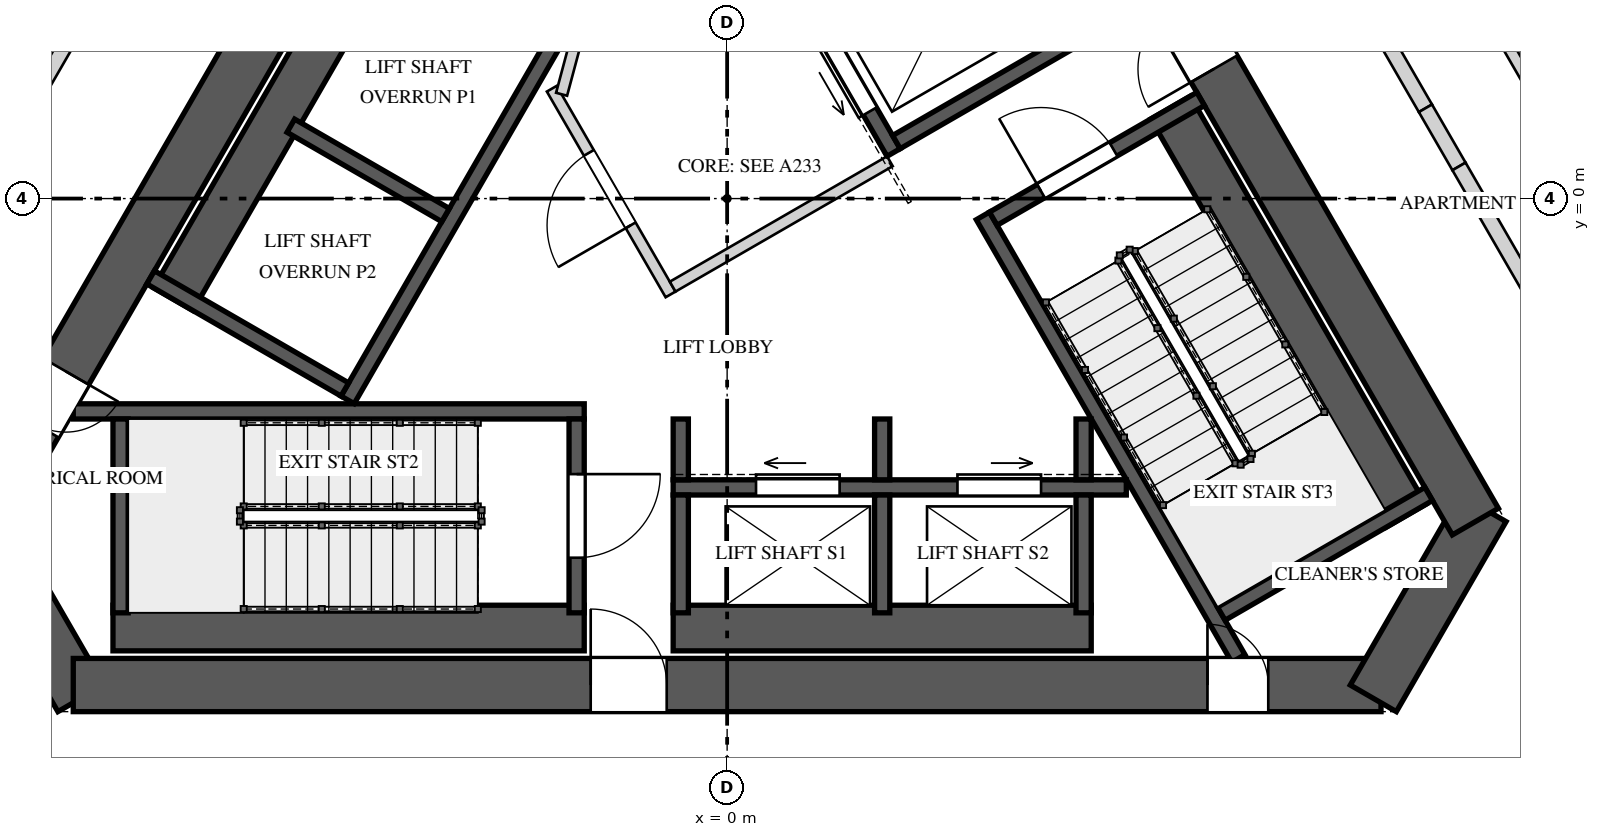
"""IFC4 building model, lengths in metres.
Left out: names, types, materials, properties, quantities, classifications, styles, units other than length and angle.
Written with IfcOpenShell. Run it as: python <this file> out.ifc"""

import sys

from ifc_helpers import new_model, si_unit, direction, frame, frame_2d, origin, place, context, subcontext, project, spatial, rectangle, extrude, element, fill, save


model = new_model("IFC4")
c1 = context("Model", 3, precision=1e-05, world=origin(), true_north=direction((0.0, 1.0)))
c2 = subcontext(c1, "Body", "Model", "MODEL_VIEW")
j1 = project(units=[si_unit("LENGTHUNIT", "METRE"), si_unit("PLANEANGLEUNIT", "RADIAN")], contexts=[c1])
p1 = place(None, origin())
s1 = spatial("IfcSite", under=j1, at=p1, CompositionType="ELEMENT")
p2 = place(p1, origin())
s2 = spatial("IfcBuilding", under=s1, at=p2, CompositionType="ELEMENT")
p3 = place(p2, frame((0.0, 0.0, 241.2)))
s3 = spatial("IfcBuildingStorey", under=s2, at=p3, CompositionType="ELEMENT", Elevation=241.2)
p4 = place(p3, frame((-1.241, 10.65, 0.0), z_axis=(0.0, 0.0, 1.0), x_axis=(-0.500003331888, -0.866023480109, 0.0)))
e1 = element("IfcWall", 1, at=p4, inside=s3, PredefinedType="SHEAR", context=c2, shape_type="SweptSolid", body=[
    extrude(rectangle(XDim=17.205, YDim=0.7, at=frame_2d((8.603, 0.0))), origin(), (0.0, 0.0, 1.0), 4.0),
])
p5 = place(p4, frame((6.808, 0.0, 0.0)))
e2 = element("IfcOpeningElement", 2, at=p5, cuts=e1, PredefinedType="OPENING", context=c2, shape_type="SweptSolid", body=[
    extrude(rectangle(XDim=1.0, YDim=2.4, at=frame_2d((0.5, 1.2))), frame((0.0, 0.36, 0.0), z_axis=(0.0, -1.0, 0.0), x_axis=(1.0, 0.0, 0.0)), (0.0, 0.0, 1.0), 0.72),
])
p6 = place(p4, frame((14.922, 0.0, 0.0)))
e3 = element("IfcOpeningElement", 3, at=p6, cuts=e1, PredefinedType="OPENING", context=c2, shape_type="SweptSolid", body=[
    extrude(rectangle(XDim=0.8, YDim=2.1, at=frame_2d((0.4, 1.05))), frame((0.0, 0.36, 0.0), z_axis=(0.0, -1.0, 0.0), x_axis=(1.0, 0.0, 0.0)), (0.0, 0.0, 1.0), 0.72),
])
p7 = place(p3, frame((-9.945, -4.075, 0.0), z_axis=(0.0, 0.0, 1.0), x_axis=(0.499995765644, -0.866027848477, 0.0)))
e4 = element("IfcWall", 4, at=p7, inside=s3, PredefinedType="SHEAR", context=c2, shape_type="SweptSolid", body=[
    extrude(rectangle(XDim=2.887, YDim=0.7, at=frame_2d((1.443, 0.0))), origin(), (0.0, 0.0, 1.0), 4.0),
])
p8 = place(p3, frame((-8.603, -6.4, 0.0), z_axis=(0.0, 0.0, 1.0), x_axis=(1.0, 0.0, 0.0)))
e5 = element("IfcWall", 5, at=p8, inside=s3, PredefinedType="SHEAR", context=c2, shape_type="SweptSolid", body=[
    extrude(rectangle(XDim=17.205, YDim=0.7, at=frame_2d((8.603, 0.0))), origin(), (0.0, 0.0, 1.0), 4.0),
])
p9 = place(p8, frame((6.808, 0.0, 0.0)))
e6 = element("IfcOpeningElement", 6, at=p9, cuts=e5, PredefinedType="OPENING", context=c2, shape_type="SweptSolid", body=[
    extrude(rectangle(XDim=1.0, YDim=2.4, at=frame_2d((0.5, 1.2))), frame((0.0, 0.36, 0.0), z_axis=(0.0, -1.0, 0.0), x_axis=(1.0, 0.0, 0.0)), (0.0, 0.0, 1.0), 0.72),
])
p10 = place(p8, frame((14.922, 0.0, 0.0)))
e7 = element("IfcOpeningElement", 7, at=p10, cuts=e5, PredefinedType="OPENING", context=c2, shape_type="SweptSolid", body=[
    extrude(rectangle(XDim=0.8, YDim=2.1, at=frame_2d((0.4, 1.05))), frame((0.0, 0.36, 0.0), z_axis=(0.0, -1.0, 0.0), x_axis=(1.0, 0.0, 0.0)), (0.0, 0.0, 1.0), 0.72),
])
p11 = place(p3, frame((8.501, -6.575, 0.0), z_axis=(0.0, 0.0, 1.0), x_axis=(0.499995765644, 0.866027848477, 0.0)))
e8 = element("IfcWall", 8, at=p11, inside=s3, PredefinedType="SHEAR", context=c2, shape_type="SweptSolid", body=[
    extrude(rectangle(XDim=2.887, YDim=0.7, at=frame_2d((1.443, 0.0))), origin(), (0.0, 0.0, 1.0), 4.0),
])
p12 = place(p3, frame((9.844, -4.25, 0.0), z_axis=(0.0, 0.0, 1.0), x_axis=(-0.500003331888, 0.866023480109, 0.0)))
e9 = element("IfcWall", 9, at=p12, inside=s3, PredefinedType="SHEAR", context=c2, shape_type="SweptSolid", body=[
    extrude(rectangle(XDim=17.205, YDim=0.7, at=frame_2d((8.603, 0.0))), origin(), (0.0, 0.0, 1.0), 4.0),
])
p13 = place(p12, frame((6.877, 0.0, 0.0)))
e10 = element("IfcOpeningElement", 10, at=p13, cuts=e9, PredefinedType="OPENING", context=c2, shape_type="SweptSolid", body=[
    extrude(rectangle(XDim=1.0, YDim=2.4, at=frame_2d((0.5, 1.2))), frame((0.0, 0.36, 0.0), z_axis=(0.0, -1.0, 0.0), x_axis=(1.0, 0.0, 0.0)), (0.0, 0.0, 1.0), 0.72),
])
p14 = place(p3, frame((9.892, -8.672, 0.0), z_axis=(0.0, 0.0, 1.0), x_axis=(0.587833242688, 0.808982125137, 0.0)))
e11 = element("IfcWall", 11, at=p14, inside=s3, PredefinedType="SOLIDWALL", context=c2, shape_type="SweptSolid", body=[
    extrude(rectangle(XDim=2.402, YDim=0.3, at=frame_2d((1.201, 0.0))), origin(), (0.0, 0.0, 1.0), 3.3),
])
p15 = place(p14, frame((0.351, 0.0, 0.0)))
e12 = element("IfcOpeningElement", 12, at=p15, cuts=e11, PredefinedType="OPENING", context=c2, shape_type="SweptSolid", body=[
    extrude(rectangle(XDim=1.7, YDim=2.5, at=frame_2d((0.85, 1.25))), frame((0.0, 0.16, 0.0), z_axis=(0.0, -1.0, 0.0), x_axis=(1.0, 0.0, 0.0)), (0.0, 0.0, 1.0), 0.32),
])
p16 = place(p3, frame((-8.08, -5.65, 0.0), z_axis=(0.0, 0.0, 1.0), x_axis=(1.0, 0.0, 0.0)))
e13 = element("IfcWall", 13, at=p16, inside=s3, PredefinedType="SOLIDWALL", context=c2, shape_type="SweptSolid", body=[
    extrude(rectangle(XDim=6.2, YDim=0.6, at=frame_2d((3.1, 0.0))), origin(), (0.0, 0.0, 1.0), 3.65),
])
p17 = place(p3, frame((-8.603, -2.8, 0.0), z_axis=(0.0, 0.0, 1.0), x_axis=(1.0, 0.0, 0.0)))
e14 = element("IfcWall", 14, at=p17, inside=s3, PredefinedType="SOLIDWALL", context=c2, shape_type="SweptSolid", body=[
    extrude(rectangle(XDim=6.723, YDim=0.2, at=frame_2d((3.361, 0.0))), origin(), (0.0, 0.0, 1.0), 3.65),
])
p18 = place(p3, frame((-7.98, -2.9, 0.0), z_axis=(0.0, 0.0, 1.0), x_axis=(0.0, -1.0, 0.0)))
e15 = element("IfcWall", 15, at=p18, inside=s3, PredefinedType="SOLIDWALL", context=c2, shape_type="SweptSolid", body=[
    extrude(rectangle(XDim=2.55, YDim=0.2, at=frame_2d((1.275, 0.0))), origin(), (0.0, 0.0, 1.0), 3.65),
])
p19 = place(p3, frame((-1.98, -2.9, 0.0), z_axis=(0.0, 0.0, 1.0), x_axis=(0.0, -1.0, 0.0)))
e16 = element("IfcWall", 16, at=p19, inside=s3, PredefinedType="SOLIDWALL", context=c2, shape_type="SweptSolid", body=[
    extrude(rectangle(XDim=2.55, YDim=0.2, at=frame_2d((1.275, 0.0))), origin(), (0.0, 0.0, 1.0), 3.65),
])
p20 = place(p19, frame((0.725, 0.0, 0.0)))
e17 = element("IfcOpeningElement", 17, at=p20, cuts=e16, PredefinedType="OPENING", context=c2, shape_type="SweptSolid", body=[
    extrude(rectangle(XDim=1.1, YDim=2.4, at=frame_2d((0.55, 1.2))), frame((0.0, 0.11, 0.0), z_axis=(0.0, -1.0, 0.0), x_axis=(1.0, 0.0, 0.0)), (0.0, 0.0, 1.0), 0.22),
])
p21 = place(p3, frame((8.933, -4.172, 0.0), z_axis=(0.0, 0.0, 1.0), x_axis=(-0.500026960575, 0.86600983753, 0.0)))
e18 = element("IfcWall", 18, at=p21, inside=s3, PredefinedType="SOLIDWALL", context=c2, shape_type="SweptSolid", body=[
    extrude(rectangle(XDim=6.2, YDim=0.6, at=frame_2d((3.1, 0.0))), origin(), (0.0, 0.0, 1.0), 3.65),
])
p22 = place(p3, frame((6.726, -6.05, 0.0), z_axis=(0.0, 0.0, 1.0), x_axis=(-0.499970804718, 0.866042259032, 0.0)))
e19 = element("IfcWall", 19, at=p22, inside=s3, PredefinedType="SOLIDWALL", context=c2, shape_type="SweptSolid", body=[
    extrude(rectangle(XDim=6.723, YDim=0.2, at=frame_2d((3.361, 0.0))), origin(), (0.0, 0.0, 1.0), 3.65),
])
p23 = place(p3, frame((6.501, -5.461, 0.0), z_axis=(0.0, 0.0, 1.0), x_axis=(0.866035871367, 0.499981869177, 0.0)))
e20 = element("IfcWall", 20, at=p23, inside=s3, PredefinedType="SOLIDWALL", context=c2, shape_type="SweptSolid", body=[
    extrude(rectangle(XDim=3.15, YDim=0.2, at=frame_2d((1.575, 0.0))), origin(), (0.0, 0.0, 1.0), 3.65),
])
p24 = place(p3, frame((3.501, -0.265, 0.0), z_axis=(0.0, 0.0, 1.0), x_axis=(0.866035871367, 0.499981869177, 0.0)))
e21 = element("IfcWall", 21, at=p24, inside=s3, PredefinedType="SOLIDWALL", context=c2, shape_type="SweptSolid", body=[
    extrude(rectangle(XDim=3.15, YDim=0.2, at=frame_2d((1.575, 0.0))), origin(), (0.0, 0.0, 1.0), 3.65),
])
p25 = place(p24, frame((0.725, 0.0, 0.0)))
e22 = element("IfcOpeningElement", 22, at=p25, cuts=e21, PredefinedType="OPENING", context=c2, shape_type="SweptSolid", body=[
    extrude(rectangle(XDim=1.1, YDim=2.4, at=frame_2d((0.55, 1.2))), frame((0.0, 0.11, 0.0), z_axis=(0.0, -1.0, 0.0), x_axis=(1.0, 0.0, 0.0)), (0.0, 0.0, 1.0), 0.22),
])
p26 = place(p3, frame((-2.243, 2.115, 0.0), z_axis=(0.0, 0.0, 1.0), x_axis=(-0.499996545922, -0.866027397988, 0.0)))
e23 = element("IfcWall", 23, at=p26, inside=s3, PredefinedType="SOLIDWALL", context=c2, shape_type="SweptSolid", body=[
    extrude(rectangle(XDim=5.5, YDim=0.2, at=frame_2d((2.75, 0.0))), origin(), (0.0, 0.0, 1.0), 3.65),
])
p27 = place(p3, frame((-4.538, 3.44, 0.0), z_axis=(0.0, 0.0, 1.0), x_axis=(-0.499996545922, -0.866027397988, 0.0)))
e24 = element("IfcWall", 24, at=p27, inside=s3, PredefinedType="SOLIDWALL", context=c2, shape_type="SweptSolid", body=[
    extrude(rectangle(XDim=5.5, YDim=0.6, at=frame_2d((2.75, 0.0))), origin(), (0.0, 0.0, 1.0), 3.65),
])
p28 = place(p3, frame((-3.705, -0.217, 0.0), z_axis=(0.0, 0.0, 1.0), x_axis=(-0.866016039709, 0.500016218704, 0.0)))
e25 = element("IfcWall", 25, at=p28, inside=s3, PredefinedType="SOLIDWALL", context=c2, shape_type="SweptSolid", body=[
    extrude(rectangle(XDim=2.35, YDim=0.2, at=frame_2d((1.175, 0.0))), origin(), (0.0, 0.0, 1.0), 3.65),
])
p29 = place(p3, frame((-5.03, -2.512, 0.0), z_axis=(0.0, 0.0, 1.0), x_axis=(-0.866003658127, 0.500037662692, 0.0)))
e26 = element("IfcWall", 26, at=p29, inside=s3, PredefinedType="SOLIDWALL", context=c2, shape_type="SweptSolid", body=[
    extrude(rectangle(XDim=2.95, YDim=0.2, at=frame_2d((1.475, 0.0))), origin(), (0.0, 0.0, 1.0), 3.65),
])
p30 = place(p3, frame((-0.71, -3.8, 0.0), z_axis=(0.0, 0.0, 1.0), x_axis=(1.0, 0.0, 0.0)))
e27 = element("IfcWall", 27, at=p30, inside=s3, PredefinedType="SOLIDWALL", context=c2, shape_type="SweptSolid", body=[
    extrude(rectangle(XDim=5.961, YDim=0.2, at=frame_2d((2.981, 0.0))), origin(), (0.0, 0.0, 1.0), 3.65),
])
p31 = place(p30, frame((1.09, 0.0, 0.0)))
e28 = element("IfcOpeningElement", 28, at=p31, cuts=e27, PredefinedType="OPENING", context=c2, shape_type="SweptSolid", body=[
    extrude(rectangle(XDim=1.1, YDim=2.1, at=frame_2d((0.55, 1.05))), frame((0.0, 0.11, 0.0), z_axis=(0.0, -1.0, 0.0), x_axis=(1.0, 0.0, 0.0)), (0.0, 0.0, 1.0), 0.22),
])
p32 = place(p30, frame((3.74, 0.0, 0.0)))
e29 = element("IfcOpeningElement", 29, at=p32, cuts=e27, PredefinedType="OPENING", context=c2, shape_type="SweptSolid", body=[
    extrude(rectangle(XDim=1.1, YDim=2.1, at=frame_2d((0.55, 1.05))), frame((0.0, 0.11, 0.0), z_axis=(0.0, -1.0, 0.0), x_axis=(1.0, 0.0, 0.0)), (0.0, 0.0, 1.0), 0.22),
])
p33 = place(p3, frame((-0.71, -5.65, 0.0), z_axis=(0.0, 0.0, 1.0), x_axis=(1.0, 0.0, 0.0)))
e30 = element("IfcWall", 30, at=p33, inside=s3, PredefinedType="SOLIDWALL", context=c2, shape_type="SweptSolid", body=[
    extrude(rectangle(XDim=5.5, YDim=0.6, at=frame_2d((2.75, 0.0))), origin(), (0.0, 0.0, 1.0), 3.65),
])
p34 = place(p3, frame((-0.61, -3.9, 0.0), z_axis=(0.0, 0.0, 1.0), x_axis=(0.0, -1.0, 0.0)))
e31 = element("IfcWall", 31, at=p34, inside=s3, PredefinedType="SOLIDWALL", context=c2, shape_type="SweptSolid", body=[
    extrude(rectangle(XDim=1.55, YDim=0.2, at=frame_2d((0.775, 0.0))), origin(), (0.0, 0.0, 1.0), 3.65),
])
p35 = place(p3, frame((-0.61, -2.9, 0.0), z_axis=(0.0, 0.0, 1.0), x_axis=(0.0, -1.0, 0.0)))
e32 = element("IfcWall", 32, at=p35, inside=s3, PredefinedType="SOLIDWALL", context=c2, shape_type="SweptSolid", body=[
    extrude(rectangle(XDim=0.8, YDim=0.2, at=frame_2d((0.4, 0.0))), origin(), (0.0, 0.0, 1.0), 3.65),
])
p36 = place(p3, frame((2.04, -3.9, 0.0), z_axis=(0.0, 0.0, 1.0), x_axis=(0.0, -1.0, 0.0)))
e33 = element("IfcWall", 33, at=p36, inside=s3, PredefinedType="SOLIDWALL", context=c2, shape_type="SweptSolid", body=[
    extrude(rectangle(XDim=1.55, YDim=0.2, at=frame_2d((0.775, 0.0))), origin(), (0.0, 0.0, 1.0), 3.65),
])
p37 = place(p3, frame((2.04, -2.9, 0.0), z_axis=(0.0, 0.0, 1.0), x_axis=(0.0, -1.0, 0.0)))
e34 = element("IfcWall", 34, at=p37, inside=s3, PredefinedType="SOLIDWALL", context=c2, shape_type="SweptSolid", body=[
    extrude(rectangle(XDim=0.8, YDim=0.2, at=frame_2d((0.4, 0.0))), origin(), (0.0, 0.0, 1.0), 3.65),
])
p38 = place(p3, frame((4.69, -3.9, 0.0), z_axis=(0.0, 0.0, 1.0), x_axis=(0.0, -1.0, 0.0)))
e35 = element("IfcWall", 35, at=p38, inside=s3, PredefinedType="SOLIDWALL", context=c2, shape_type="SweptSolid", body=[
    extrude(rectangle(XDim=1.55, YDim=0.2, at=frame_2d((0.775, 0.0))), origin(), (0.0, 0.0, 1.0), 3.65),
])
p39 = place(p3, frame((4.69, -2.9, 0.0), z_axis=(0.0, 0.0, 1.0), x_axis=(0.0, -1.0, 0.0)))
e36 = element("IfcWall", 36, at=p39, inside=s3, PredefinedType="SOLIDWALL", context=c2, shape_type="SweptSolid", body=[
    extrude(rectangle(XDim=0.8, YDim=0.2, at=frame_2d((0.4, 0.0))), origin(), (0.0, 0.0, 1.0), 3.65),
])
p40 = place(p3, frame((2.19, 0.606, 0.0), z_axis=(0.0, 0.0, 1.0), x_axis=(-0.500002801628, 0.866023786258, 0.0)))
e37 = element("IfcWall", 37, at=p40, inside=s3, PredefinedType="SOLIDWALL", context=c2, shape_type="SweptSolid", body=[
    extrude(rectangle(XDim=4.9, YDim=0.2, at=frame_2d((2.45, 0.0))), origin(), (0.0, 0.0, 1.0), 3.65),
])
p41 = place(p40, frame((0.625, 0.0, 0.0)))
e38 = element("IfcOpeningElement", 38, at=p41, cuts=e37, PredefinedType="OPENING", context=c2, shape_type="SweptSolid", body=[
    extrude(rectangle(XDim=1.3, YDim=2.1, at=frame_2d((0.65, 1.05))), frame((0.0, 0.11, 0.0), z_axis=(0.0, -1.0, 0.0), x_axis=(1.0, 0.0, 0.0)), (0.0, 0.0, 1.0), 0.22),
])
p42 = place(p40, frame((2.975, 0.0, 0.0)))
e39 = element("IfcOpeningElement", 39, at=p42, cuts=e37, PredefinedType="OPENING", context=c2, shape_type="SweptSolid", body=[
    extrude(rectangle(XDim=1.3, YDim=2.1, at=frame_2d((0.65, 1.05))), frame((0.0, 0.11, 0.0), z_axis=(0.0, -1.0, 0.0), x_axis=(1.0, 0.0, 0.0)), (0.0, 0.0, 1.0), 0.22),
])
p43 = place(p3, frame((2.227, 0.743, 0.0), z_axis=(0.0, 0.0, 1.0), x_axis=(0.866022959057, 0.500004234368, 0.0)))
e40 = element("IfcWall", 40, at=p43, inside=s3, PredefinedType="SOLIDWALL", context=c2, shape_type="SweptSolid", body=[
    extrude(rectangle(XDim=3.75, YDim=0.2, at=frame_2d((1.875, 0.0))), origin(), (0.0, 0.0, 1.0), 3.65),
])
p44 = place(p3, frame((-0.744, -1.261, 0.0), z_axis=(0.0, 0.0, 1.0), x_axis=(-0.500004234368, 0.866022959057, 0.0)))
e41 = element("IfcWall", 41, at=p44, inside=s3, PredefinedType="PARTITIONING", context=c2, shape_type="SweptSolid", body=[
    extrude(rectangle(XDim=3.125, YDim=0.15, at=frame_2d((1.562, 0.0))), origin(), (0.0, 0.0, 1.0), 3.65),
])
p45 = place(p44, frame((1.05, 0.0, 0.0)))
e42 = element("IfcOpeningElement", 42, at=p45, cuts=e41, PredefinedType="OPENING", context=c2, shape_type="SweptSolid", body=[
    extrude(rectangle(XDim=1.1, YDim=2.4, at=frame_2d((0.55, 1.2))), frame((0.0, 0.085, 0.0), z_axis=(0.0, -1.0, 0.0), x_axis=(1.0, 0.0, 0.0)), (0.0, 0.0, 1.0), 0.17),
])
p46 = place(p3, frame((-0.717, -1.159, 0.0), z_axis=(0.0, 0.0, 1.0), x_axis=(0.866008176907, 0.50002983664, 0.0)))
e43 = element("IfcWall", 43, at=p46, inside=s3, PredefinedType="PARTITIONING", context=c2, shape_type="SweptSolid", body=[
    extrude(rectangle(XDim=3.3, YDim=0.15, at=frame_2d((1.65, 0.0))), origin(), (0.0, 0.0, 1.0), 3.65),
])
p47 = place(p3, frame((-2.178, 1.372, 0.0), z_axis=(0.0, 0.0, 1.0), x_axis=(0.258808958833, 0.96592852884, 0.0)))
e44 = element("IfcWall", 44, at=p47, inside=s3, PredefinedType="PARTITIONING", context=c2, shape_type="SweptSolid", body=[
    extrude(rectangle(XDim=2.903, YDim=0.15, at=frame_2d((1.451, 0.0))), origin(), (0.0, 0.0, 1.0), 3.65),
])
p48 = place(p3, frame((10.196, 2.139, 0.0), z_axis=(0.0, 0.0, 1.0), x_axis=(0.500109093648, -0.865962409375, 0.0)))
e45 = element("IfcWall", 45, at=p48, inside=s3, PredefinedType="PARTITIONING", context=c2, shape_type="SweptSolid", body=[
    extrude(rectangle(XDim=0.966, YDim=0.15, at=frame_2d((0.483, 0.0))), origin(), (0.0, 0.0, 1.0), 3.65),
])
p49 = place(p3, frame((-10.51, -1.105, 0.0), z_axis=(0.0, 0.0, 1.0), x_axis=(0.499997905474, 0.866026613056, 0.0)))
e46 = element("IfcWall", 46, at=p49, inside=s3, PredefinedType="SOLIDWALL", context=c2, shape_type="SweptSolid", body=[
    extrude(rectangle(XDim=3.811, YDim=0.2, at=frame_2d((1.905, 0.0))), origin(), (0.0, 0.0, 1.0), 3.65),
])
p50 = place(p3, frame((8.472, 2.426, 0.0), z_axis=(0.0, 0.0, 1.0), x_axis=(0.499904796234, -0.866080362727, 0.0)))
e47 = element("IfcWall", 47, at=p50, inside=s3, PredefinedType="SOLIDWALL", context=c2, shape_type="SweptSolid", body=[
    extrude(rectangle(XDim=1.429, YDim=0.2, at=frame_2d((0.715, 0.0))), origin(), (0.0, 0.0, 1.0), 3.65),
])
p51 = place(p3, frame((9.187, 1.188, 0.0), z_axis=(0.0, 0.0, 1.0), x_axis=(0.500121072013, -0.86595549154, 0.0)))
e48 = element("IfcWall", 48, at=p51, inside=s3, PredefinedType="SOLIDWALL", context=c2, shape_type="SweptSolid", body=[
    extrude(rectangle(XDim=0.884, YDim=0.2, at=frame_2d((0.442, 0.0))), origin(), (0.0, 0.0, 1.0), 2.75),
])
p52 = place(p3, frame((9.629, 0.423, 0.0), z_axis=(0.0, 0.0, 1.0), x_axis=(0.499995433041, -0.866028040503, 0.0)))
e49 = element("IfcWall", 49, at=p52, inside=s3, PredefinedType="SOLIDWALL", context=c2, shape_type="SweptSolid", body=[
    extrude(rectangle(XDim=5.161, YDim=0.2, at=frame_2d((2.581, 0.0))), origin(), (0.0, 0.0, 1.0), 3.65),
])
p53 = place(p15, origin())
e50 = element("IfcDoor", 50, at=p53, inside=s3, OperationType="SLIDING_TO_LEFT", PredefinedType="DOOR", context=c2, shape_type="SweptSolid", body=[
    extrude(rectangle(XDim=1.7, YDim=2.5, at=frame_2d((0.85, 1.25))), frame((0.0, 0.025, 0.0), z_axis=(0.0, -1.0, 0.0), x_axis=(1.0, 0.0, 0.0)), (0.0, 0.0, 1.0), 0.05),
])
fill(e12, e50)
p54 = place(p20, origin())
e51 = element("IfcDoor", 51, at=p54, inside=s3, OperationType="SINGLE_SWING_LEFT", PredefinedType="DOOR", context=c2, shape_type="SweptSolid", body=[
    extrude(rectangle(XDim=1.1, YDim=2.4, at=frame_2d((0.55, 1.2))), frame((0.0, 0.025, 0.0), z_axis=(0.0, -1.0, 0.0), x_axis=(1.0, 0.0, 0.0)), (0.0, 0.0, 1.0), 0.05),
])
fill(e17, e51)
p55 = place(p25, origin())
e52 = element("IfcDoor", 52, at=p55, inside=s3, OperationType="SINGLE_SWING_RIGHT", PredefinedType="DOOR", context=c2, shape_type="SweptSolid", body=[
    extrude(rectangle(XDim=1.1, YDim=2.4, at=frame_2d((0.55, 1.2))), frame((0.0, 0.025, 0.0), z_axis=(0.0, -1.0, 0.0), x_axis=(1.0, 0.0, 0.0)), (0.0, 0.0, 1.0), 0.05),
])
fill(e22, e52)
p56 = place(p31, origin())
e53 = element("IfcDoor", 53, at=p56, inside=s3, OperationType="SLIDING_TO_LEFT", PredefinedType="DOOR", context=c2, shape_type="SweptSolid", body=[
    extrude(rectangle(XDim=1.1, YDim=2.1, at=frame_2d((0.55, 1.05))), frame((0.0, 0.025, 0.0), z_axis=(0.0, -1.0, 0.0), x_axis=(1.0, 0.0, 0.0)), (0.0, 0.0, 1.0), 0.05),
])
fill(e28, e53)
p57 = place(p32, origin())
e54 = element("IfcDoor", 54, at=p57, inside=s3, OperationType="SLIDING_TO_RIGHT", PredefinedType="DOOR", context=c2, shape_type="SweptSolid", body=[
    extrude(rectangle(XDim=1.1, YDim=2.1, at=frame_2d((0.55, 1.05))), frame((0.0, 0.025, 0.0), z_axis=(0.0, -1.0, 0.0), x_axis=(1.0, 0.0, 0.0)), (0.0, 0.0, 1.0), 0.05),
])
fill(e29, e54)
p58 = place(p41, origin())
e55 = element("IfcDoor", 55, at=p58, inside=s3, OperationType="SLIDING_TO_LEFT", PredefinedType="DOOR", context=c2, shape_type="SweptSolid", body=[
    extrude(rectangle(XDim=1.3, YDim=2.1, at=frame_2d((0.65, 1.05))), frame((0.0, 0.025, 0.0), z_axis=(0.0, -1.0, 0.0), x_axis=(1.0, 0.0, 0.0)), (0.0, 0.0, 1.0), 0.05),
])
fill(e38, e55)
p59 = place(p45, origin())
e56 = element("IfcDoor", 56, at=p59, inside=s3, OperationType="SINGLE_SWING_LEFT", PredefinedType="DOOR", context=c2, shape_type="SweptSolid", body=[
    extrude(rectangle(XDim=1.1, YDim=2.4, at=frame_2d((0.55, 1.2))), frame((0.0, 0.025, 0.0), z_axis=(0.0, -1.0, 0.0), x_axis=(1.0, 0.0, 0.0)), (0.0, 0.0, 1.0), 0.05),
])
fill(e42, e56)
p60 = place(p9, origin())
e57 = element("IfcDoor", 57, at=p60, inside=s3, OperationType="SINGLE_SWING_LEFT", PredefinedType="DOOR", context=c2, shape_type="SweptSolid", body=[
    extrude(rectangle(XDim=1.0, YDim=2.4, at=frame_2d((0.5, 1.2))), frame((0.0, 0.025, 0.0), z_axis=(0.0, -1.0, 0.0), x_axis=(1.0, 0.0, 0.0)), (0.0, 0.0, 1.0), 0.05),
])
fill(e6, e57)
p61 = place(p13, origin())
e58 = element("IfcDoor", 58, at=p61, inside=s3, OperationType="SINGLE_SWING_RIGHT", PredefinedType="DOOR", context=c2, shape_type="SweptSolid", body=[
    extrude(rectangle(XDim=1.0, YDim=2.4, at=frame_2d((0.5, 1.2))), frame((0.0, 0.025, 0.0), z_axis=(0.0, -1.0, 0.0), x_axis=(1.0, 0.0, 0.0)), (0.0, 0.0, 1.0), 0.05),
])
fill(e10, e58)
p62 = place(p6, origin())
e59 = element("IfcDoor", 59, at=p62, inside=s3, OperationType="SINGLE_SWING_LEFT", PredefinedType="DOOR", context=c2, shape_type="SweptSolid", body=[
    extrude(rectangle(XDim=0.8, YDim=2.1, at=frame_2d((0.4, 1.05))), frame((0.0, 0.025, 0.0), z_axis=(0.0, -1.0, 0.0), x_axis=(1.0, 0.0, 0.0)), (0.0, 0.0, 1.0), 0.05),
])
fill(e3, e59)
p63 = place(p10, origin())
e60 = element("IfcDoor", 60, at=p63, inside=s3, OperationType="SINGLE_SWING_RIGHT", PredefinedType="DOOR", context=c2, shape_type="SweptSolid", body=[
    extrude(rectangle(XDim=0.8, YDim=2.1, at=frame_2d((0.4, 1.05))), frame((0.0, 0.025, 0.0), z_axis=(0.0, -1.0, 0.0), x_axis=(1.0, 0.0, 0.0)), (0.0, 0.0, 1.0), 0.05),
])
fill(e7, e60)
save(model, sys.argv[1])
